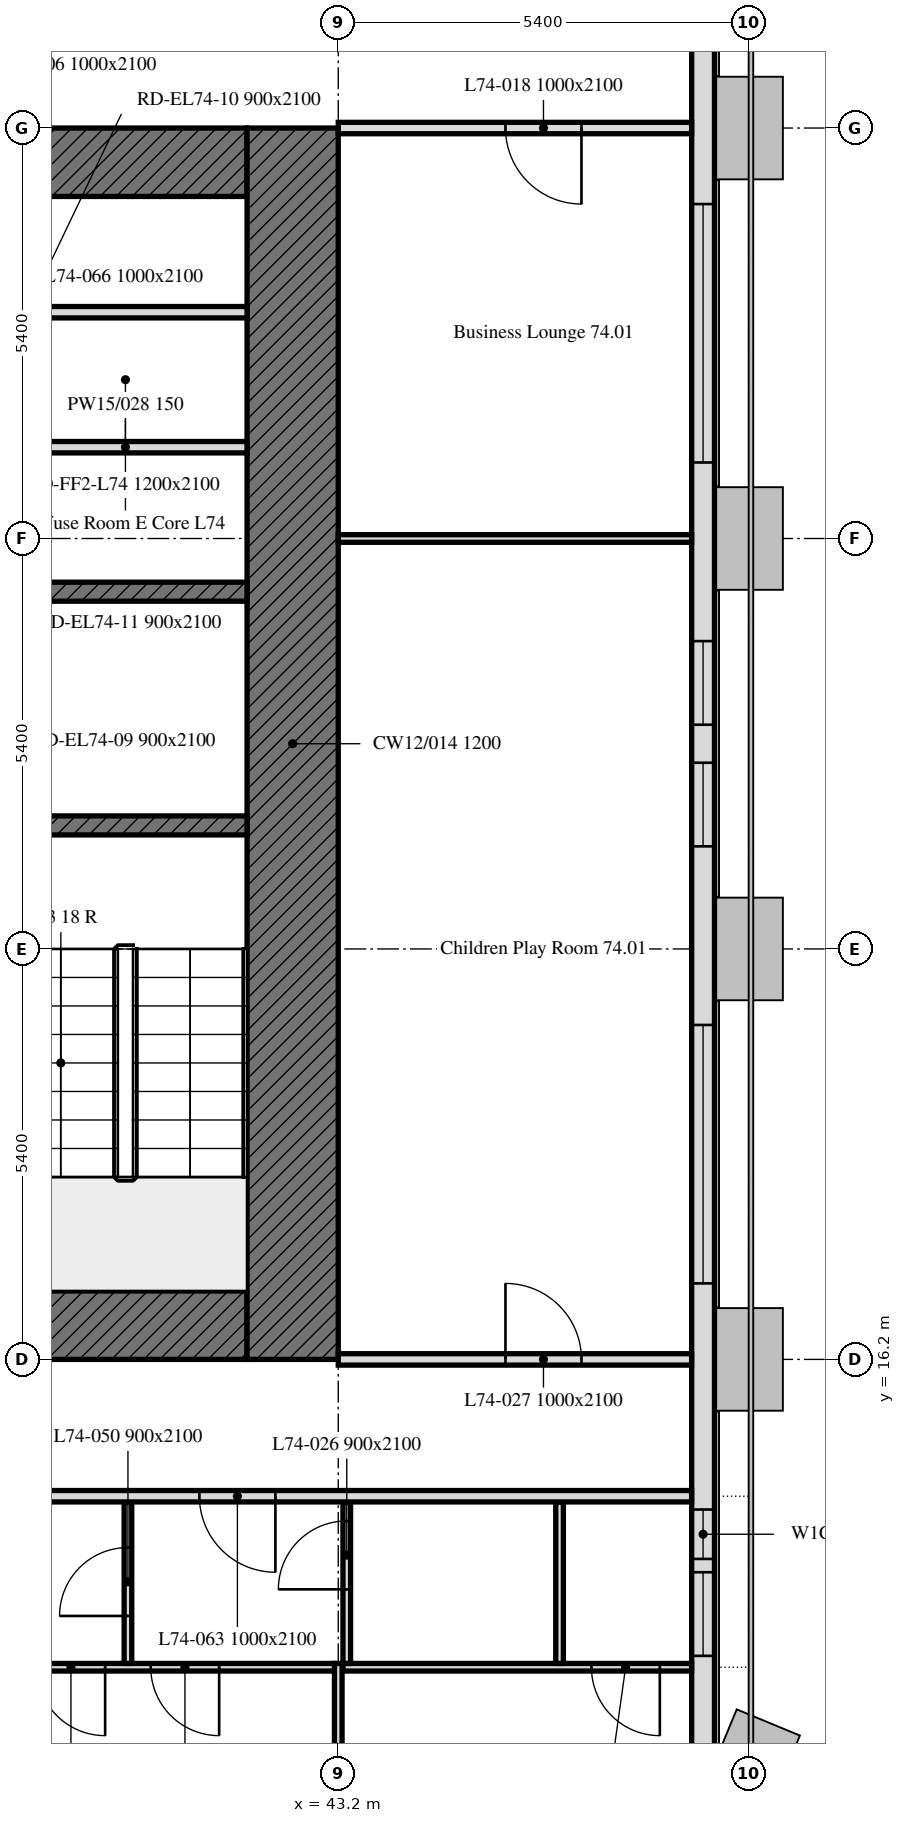
"""IFC4 building model, lengths in metres.
Left out: names, types, materials, properties, quantities, classifications, styles, units other than length and angle.
Written with IfcOpenShell. Run it as: python <this file> out.ifc"""

import sys

from ifc_helpers import new_model, si_unit, direction, frame, frame_2d, origin, place, context, subcontext, project, spatial, rectangle, extrude, element, fill, save


model = new_model("IFC4")
c1 = context("Model", 3, precision=1e-05, world=origin(), true_north=direction((0.0, 1.0)))
c2 = subcontext(c1, "Body", "Model", "MODEL_VIEW")
j1 = project(units=[si_unit("LENGTHUNIT", "METRE"), si_unit("PLANEANGLEUNIT", "RADIAN")], contexts=[c1])
p1 = place(None, origin())
s1 = spatial("IfcSite", under=j1, at=p1, CompositionType="ELEMENT")
p2 = place(p1, origin())
s2 = spatial("IfcBuilding", under=s1, at=p2, CompositionType="ELEMENT")
p3 = place(p2, frame((0.0, 0.0, 298.3)))
s3 = spatial("IfcBuildingStorey", under=s2, at=p3, CompositionType="ELEMENT", Elevation=298.3)
p4 = place(p3, frame((48.0, 10.986, 0.0), z_axis=(0.0, 0.0, 1.0), x_axis=(0.0, 1.0, 0.0)))
e1 = element("IfcWall", 1, at=p4, inside=s3, PredefinedType="SOLIDWALL", context=c2, shape_type="SweptSolid", body=[
    extrude(rectangle(XDim=32.027, YDim=0.3, at=frame_2d((16.014, 0.0))), origin(), (0.0, 0.0, 1.0), 3.0),
])
p5 = place(p4, frame((1.314, 0.0, 0.9)))
e2 = element("IfcOpeningElement", 2, at=p5, cuts=e1, PredefinedType="OPENING", context=c2, shape_type="SweptSolid", body=[
    extrude(rectangle(XDim=1.1, YDim=1.7, at=frame_2d((0.55, 0.85))), frame((0.0, 0.16, 0.0), z_axis=(0.0, -1.0, 0.0), x_axis=(1.0, 0.0, 0.0)), (0.0, 0.0, 1.0), 0.32),
])
p6 = place(p4, frame((2.589, 0.0, 0.9)))
e3 = element("IfcOpeningElement", 3, at=p6, cuts=e1, PredefinedType="OPENING", context=c2, shape_type="SweptSolid", body=[
    extrude(rectangle(XDim=0.65, YDim=1.7, at=frame_2d((0.325, 0.85))), frame((0.0, 0.16, 0.0), z_axis=(0.0, -1.0, 0.0), x_axis=(1.0, 0.0, 0.0)), (0.0, 0.0, 1.0), 0.32),
])
p7 = place(p4, frame((6.214, 0.0, 0.9)))
e4 = element("IfcOpeningElement", 4, at=p7, cuts=e1, PredefinedType="OPENING", context=c2, shape_type="SweptSolid", body=[
    extrude(rectangle(XDim=3.4, YDim=1.7, at=frame_2d((1.7, 0.85))), frame((0.0, 0.16, 0.0), z_axis=(0.0, -1.0, 0.0), x_axis=(1.0, 0.0, 0.0)), (0.0, 0.0, 1.0), 0.32),
])
p8 = place(p4, frame((11.964, 0.0, 0.9)))
e5 = element("IfcOpeningElement", 5, at=p8, cuts=e1, PredefinedType="OPENING", context=c2, shape_type="SweptSolid", body=[
    extrude(rectangle(XDim=1.1, YDim=1.7, at=frame_2d((0.55, 0.85))), frame((0.0, 0.16, 0.0), z_axis=(0.0, -1.0, 0.0), x_axis=(1.0, 0.0, 0.0)), (0.0, 0.0, 1.0), 0.32),
])
p9 = place(p4, frame((13.564, 0.0, 0.9)))
e6 = element("IfcOpeningElement", 6, at=p9, cuts=e1, PredefinedType="OPENING", context=c2, shape_type="SweptSolid", body=[
    extrude(rectangle(XDim=1.1, YDim=1.7, at=frame_2d((0.55, 0.85))), frame((0.0, 0.16, 0.0), z_axis=(0.0, -1.0, 0.0), x_axis=(1.0, 0.0, 0.0)), (0.0, 0.0, 1.0), 0.32),
])
p10 = place(p4, frame((17.014, 0.0, 0.9)))
e7 = element("IfcOpeningElement", 7, at=p10, cuts=e1, PredefinedType="OPENING", context=c2, shape_type="SweptSolid", body=[
    extrude(rectangle(XDim=3.4, YDim=1.7, at=frame_2d((1.7, 0.85))), frame((0.0, 0.16, 0.0), z_axis=(0.0, -1.0, 0.0), x_axis=(1.0, 0.0, 0.0)), (0.0, 0.0, 1.0), 0.32),
])
p11 = place(p4, frame((23.389, 0.0, 0.9)))
e8 = element("IfcOpeningElement", 8, at=p11, cuts=e1, PredefinedType="OPENING", context=c2, shape_type="SweptSolid", body=[
    extrude(rectangle(XDim=0.65, YDim=1.7, at=frame_2d((0.325, 0.85))), frame((0.0, 0.16, 0.0), z_axis=(0.0, -1.0, 0.0), x_axis=(1.0, 0.0, 0.0)), (0.0, 0.0, 1.0), 0.32),
])
p12 = place(p4, frame((24.364, 0.0, 0.9)))
e9 = element("IfcOpeningElement", 9, at=p12, cuts=e1, PredefinedType="OPENING", context=c2, shape_type="SweptSolid", body=[
    extrude(rectangle(XDim=1.1, YDim=1.7, at=frame_2d((0.55, 0.85))), frame((0.0, 0.16, 0.0), z_axis=(0.0, -1.0, 0.0), x_axis=(1.0, 0.0, 0.0)), (0.0, 0.0, 1.0), 0.32),
])
p13 = place(p4, frame((28.164, 0.0, 0.9)))
e10 = element("IfcOpeningElement", 10, at=p13, cuts=e1, PredefinedType="OPENING", context=c2, shape_type="SweptSolid", body=[
    extrude(rectangle(XDim=1.1, YDim=1.7, at=frame_2d((0.55, 0.85))), frame((0.0, 0.16, 0.0), z_axis=(0.0, -1.0, 0.0), x_axis=(1.0, 0.0, 0.0)), (0.0, 0.0, 1.0), 0.32),
])
p14 = place(p4, frame((29.764, 0.0, 0.9)))
e11 = element("IfcOpeningElement", 11, at=p14, cuts=e1, PredefinedType="OPENING", context=c2, shape_type="SweptSolid", body=[
    extrude(rectangle(XDim=1.1, YDim=1.7, at=frame_2d((0.55, 0.85))), frame((0.0, 0.16, 0.0), z_axis=(0.0, -1.0, 0.0), x_axis=(1.0, 0.0, 0.0)), (0.0, 0.0, 1.0), 0.32),
])
p15 = place(p3, frame((42.0, 16.65, 0.0), z_axis=(0.0, 0.0, 1.0), x_axis=(-1.0, 0.0, 0.0)))
e12 = element("IfcWall", 12, at=p15, inside=s3, PredefinedType="SOLIDWALL", context=c2, shape_type="SweptSolid", body=[
    extrude(rectangle(XDim=11.1, YDim=0.9, at=frame_2d((5.55, 0.0))), origin(), (0.0, 0.0, 1.0), 3.0),
])
p16 = place(p15, frame((3.55, 0.0, 0.0)))
e13 = element("IfcOpeningElement", 13, at=p16, cuts=e12, PredefinedType="OPENING", context=c2, shape_type="SweptSolid", body=[
    extrude(rectangle(XDim=2.0, YDim=2.4, at=frame_2d((1.0, 1.2))), frame((0.0, 0.45, 0.0), z_axis=(0.0, -1.0, 0.0), x_axis=(1.0, 0.0, 0.0)), (0.0, 0.0, 1.0), 0.9),
])
p17 = place(p3, frame((30.9, 31.95, 0.0), z_axis=(0.0, 0.0, 1.0), x_axis=(1.0, 0.0, 0.0)))
e14 = element("IfcWall", 14, at=p17, inside=s3, PredefinedType="SOLIDWALL", context=c2, shape_type="SweptSolid", body=[
    extrude(rectangle(XDim=11.1, YDim=0.9, at=frame_2d((5.55, 0.0))), origin(), (0.0, 0.0, 1.0), 3.0),
])
p18 = place(p17, frame((5.55, 0.0, 0.0)))
e15 = element("IfcOpeningElement", 15, at=p18, cuts=e14, PredefinedType="OPENING", context=c2, shape_type="SweptSolid", body=[
    extrude(rectangle(XDim=2.0, YDim=2.4, at=frame_2d((1.0, 1.2))), frame((0.0, 0.45, 0.0), z_axis=(0.0, -1.0, 0.0), x_axis=(1.0, 0.0, 0.0)), (0.0, 0.0, 1.0), 0.9),
])
p19 = place(p3, frame((42.6, 32.4, 0.0), z_axis=(0.0, 0.0, 1.0), x_axis=(0.0, -1.0, 0.0)))
e16 = element("IfcWall", 16, at=p19, inside=s3, PredefinedType="SOLIDWALL", context=c2, shape_type="SweptSolid", body=[
    extrude(rectangle(XDim=16.2, YDim=1.2, at=frame_2d((8.1, 0.0))), origin(), (0.0, 0.0, 1.0), 3.0),
])
for number, where, z_axis, x_axis in (
    (17, (38.8, 23.225, 0.0), (0.0, 0.0, 1.0), (1.0, 0.0, 0.0)),
    (18, (38.8, 26.3, 0.0), (0.0, 0.0, 1.0), (1.0, 0.0, 0.0)),
):
    element("IfcWall", number, at=place(p3, frame(where, z_axis=z_axis, x_axis=x_axis)), inside=s3, PredefinedType="SOLIDWALL", context=c2, shape_type="SweptSolid", body=[
        extrude(rectangle(XDim=3.2, YDim=0.25, at=frame_2d((1.6, 0.0))), origin(), (0.0, 0.0, 1.0), 3.0),
    ])
for number, where, z_axis, x_axis in (
    (19, (38.8, 28.201, 0.0), (0.0, 0.0, 1.0), (1.0, 0.0, 0.0)),
    (20, (38.8, 29.977, 0.0), (0.0, 0.0, 1.0), (1.0, 0.0, 0.0)),
):
    element("IfcWall", number, at=place(p3, frame(where, z_axis=z_axis, x_axis=x_axis)), inside=s3, PredefinedType="PARTITIONING", context=c2, shape_type="SweptSolid", body=[
        extrude(rectangle(XDim=3.2, YDim=0.15, at=frame_2d((1.6, 0.0))), origin(), (0.0, 0.0, 1.0), 3.0),
    ])
p20 = place(p3, frame((47.849, 32.4, 0.0), z_axis=(0.0, 0.0, 1.0), x_axis=(-1.0, 0.0, 0.0)))
e21 = element("IfcWall", 21, at=p20, inside=s3, PredefinedType="PARTITIONING", context=c2, shape_type="SweptSolid", body=[
    extrude(rectangle(XDim=4.649, YDim=0.15, at=frame_2d((2.325, 0.0))), origin(), (0.0, 0.0, 1.0), 2.4),
])
p21 = place(p20, frame((1.449, 0.0, 0.0)))
e22 = element("IfcOpeningElement", 22, at=p21, cuts=e21, PredefinedType="OPENING", context=c2, shape_type="SweptSolid", body=[
    extrude(rectangle(XDim=1.0, YDim=2.1, at=frame_2d((0.5, 1.05))), frame((0.0, 0.075, 0.0), z_axis=(0.0, -1.0, 0.0), x_axis=(1.0, 0.0, 0.0)), (0.0, 0.0, 1.0), 0.15),
])
p22 = place(p3, frame((43.2, 27.0, 0.0), z_axis=(0.0, 0.0, 1.0), x_axis=(1.0, 0.0, 0.0)))
e23 = element("IfcWall", 23, at=p22, inside=s3, PredefinedType="PARTITIONING", context=c2, shape_type="SweptSolid", body=[
    extrude(rectangle(XDim=4.649, YDim=0.1, at=frame_2d((2.325, 0.0))), origin(), (0.0, 0.0, 1.0), 2.4),
])
p23 = place(p3, frame((43.2, 11.12, 0.0), z_axis=(0.0, 0.0, 1.0), x_axis=(0.0, 1.0, 0.0)))
e24 = element("IfcWall", 24, at=p23, inside=s3, PredefinedType="PARTITIONING", context=c2, shape_type="SweptSolid", body=[
    extrude(rectangle(XDim=1.08, YDim=0.1, at=frame_2d((0.54, 0.0))), origin(), (0.0, 0.0, 1.0), 3.0),
])
p24 = place(p3, frame((43.15, 12.15, 0.0), z_axis=(0.0, 0.0, 1.0), x_axis=(-1.0, 0.0, 0.0)))
e25 = element("IfcWall", 25, at=p24, inside=s3, PredefinedType="PARTITIONING", context=c2, shape_type="SweptSolid", body=[
    extrude(rectangle(XDim=5.275, YDim=0.1, at=frame_2d((2.637, 0.0))), origin(), (0.0, 0.0, 1.0), 3.0),
])
p25 = place(p24, frame((3.017, 0.0, 0.0)))
e26 = element("IfcOpeningElement", 26, at=p25, cuts=e25, PredefinedType="OPENING", context=c2, shape_type="SweptSolid", body=[
    extrude(rectangle(XDim=0.9, YDim=2.1, at=frame_2d((0.45, 1.05))), frame((0.0, 0.05, 0.0), z_axis=(0.0, -1.0, 0.0), x_axis=(1.0, 0.0, 0.0)), (0.0, 0.0, 1.0), 0.1),
])
p26 = place(p24, frame((1.517, 0.0, 0.0)))
e27 = element("IfcOpeningElement", 27, at=p26, cuts=e25, PredefinedType="OPENING", context=c2, shape_type="SweptSolid", body=[
    extrude(rectangle(XDim=0.9, YDim=2.1, at=frame_2d((0.45, 1.05))), frame((0.0, 0.05, 0.0), z_axis=(0.0, -1.0, 0.0), x_axis=(1.0, 0.0, 0.0)), (0.0, 0.0, 1.0), 0.1),
])
p27 = place(p3, frame((47.849, 12.15, 0.0), z_axis=(0.0, 0.0, 1.0), x_axis=(-1.0, 0.0, 0.0)))
e28 = element("IfcWall", 28, at=p27, inside=s3, PredefinedType="PARTITIONING", context=c2, shape_type="SweptSolid", body=[
    extrude(rectangle(XDim=4.587, YDim=0.1, at=frame_2d((2.293, 0.0))), origin(), (0.0, 0.0, 1.0), 3.0),
])
p28 = place(p27, frame((0.418, 0.0, 0.0)))
e29 = element("IfcOpeningElement", 29, at=p28, cuts=e28, PredefinedType="OPENING", context=c2, shape_type="SweptSolid", body=[
    extrude(rectangle(XDim=0.9, YDim=2.1, at=frame_2d((0.45, 1.05))), frame((0.0, 0.05, 0.0), z_axis=(0.0, -1.0, 0.0), x_axis=(1.0, 0.0, 0.0)), (0.0, 0.0, 1.0), 0.1),
])
p29 = place(p3, frame((40.433, 12.2, 0.0), z_axis=(0.0, 0.0, 1.0), x_axis=(0.0, 1.0, 0.0)))
e30 = element("IfcWall", 30, at=p29, inside=s3, PredefinedType="PARTITIONING", context=c2, shape_type="SweptSolid", body=[
    extrude(rectangle(XDim=2.125, YDim=0.1, at=frame_2d((1.062, 0.0))), origin(), (0.0, 0.0, 1.0), 3.0),
])
p30 = place(p29, frame((0.625, 0.0, 0.0)))
e31 = element("IfcOpeningElement", 31, at=p30, cuts=e30, PredefinedType="OPENING", context=c2, shape_type="SweptSolid", body=[
    extrude(rectangle(XDim=0.9, YDim=2.1, at=frame_2d((0.45, 1.05))), frame((0.0, 0.05, 0.0), z_axis=(0.0, -1.0, 0.0), x_axis=(1.0, 0.0, 0.0)), (0.0, 0.0, 1.0), 0.1),
])
p31 = place(p3, frame((43.312, 12.2, 0.0), z_axis=(0.0, 0.0, 1.0), x_axis=(0.0, 1.0, 0.0)))
e32 = element("IfcWall", 32, at=p31, inside=s3, PredefinedType="PARTITIONING", context=c2, shape_type="SweptSolid", body=[
    extrude(rectangle(XDim=2.125, YDim=0.1, at=frame_2d((1.062, 0.0))), origin(), (0.0, 0.0, 1.0), 3.0),
])
p32 = place(p31, frame((0.975, 0.0, 0.0)))
e33 = element("IfcOpeningElement", 33, at=p32, cuts=e32, PredefinedType="OPENING", context=c2, shape_type="SweptSolid", body=[
    extrude(rectangle(XDim=0.9, YDim=2.1, at=frame_2d((0.45, 1.05))), frame((0.0, 0.05, 0.0), z_axis=(0.0, -1.0, 0.0), x_axis=(1.0, 0.0, 0.0)), (0.0, 0.0, 1.0), 0.1),
])
p33 = place(p3, frame((46.112, 12.2, 0.0), z_axis=(0.0, 0.0, 1.0), x_axis=(0.0, 1.0, 0.0)))
e34 = element("IfcWall", 34, at=p33, inside=s3, PredefinedType="PARTITIONING", context=c2, shape_type="SweptSolid", body=[
    extrude(rectangle(XDim=2.125, YDim=0.1, at=frame_2d((1.062, 0.0))), origin(), (0.0, 0.0, 1.0), 3.0),
])
p34 = place(p3, frame((47.849, 14.4, 0.0), z_axis=(0.0, 0.0, 1.0), x_axis=(-1.0, 0.0, 0.0)))
e35 = element("IfcWall", 35, at=p34, inside=s3, PredefinedType="PARTITIONING", context=c2, shape_type="SweptSolid", body=[
    extrude(rectangle(XDim=41.698, YDim=0.15, at=frame_2d((20.849, 0.0))), origin(), (0.0, 0.0, 1.0), 3.0),
])
p35 = place(p34, frame((38.179, 0.0, 0.0)))
e36 = element("IfcOpeningElement", 36, at=p35, cuts=e35, PredefinedType="OPENING", context=c2, shape_type="SweptSolid", body=[
    extrude(rectangle(XDim=1.0, YDim=2.1, at=frame_2d((0.5, 1.05))), frame((0.0, 0.075, 0.0), z_axis=(0.0, -1.0, 0.0), x_axis=(1.0, 0.0, 0.0)), (0.0, 0.0, 1.0), 0.15),
])
p36 = place(p34, frame((27.977, 0.0, 0.0)))
e37 = element("IfcOpeningElement", 37, at=p36, cuts=e35, PredefinedType="OPENING", context=c2, shape_type="SweptSolid", body=[
    extrude(rectangle(XDim=1.0, YDim=2.1, at=frame_2d((0.5, 1.05))), frame((0.0, 0.075, 0.0), z_axis=(0.0, -1.0, 0.0), x_axis=(1.0, 0.0, 0.0)), (0.0, 0.0, 1.0), 0.15),
])
p37 = place(p34, frame((16.399, 0.0, 0.0)))
e38 = element("IfcOpeningElement", 38, at=p37, cuts=e35, PredefinedType="OPENING", context=c2, shape_type="SweptSolid", body=[
    extrude(rectangle(XDim=1.0, YDim=2.1, at=frame_2d((0.5, 1.05))), frame((0.0, 0.075, 0.0), z_axis=(0.0, -1.0, 0.0), x_axis=(1.0, 0.0, 0.0)), (0.0, 0.0, 1.0), 0.15),
])
p38 = place(p34, frame((5.476, 0.0, 0.0)))
e39 = element("IfcOpeningElement", 39, at=p38, cuts=e35, PredefinedType="OPENING", context=c2, shape_type="SweptSolid", body=[
    extrude(rectangle(XDim=1.0, YDim=2.1, at=frame_2d((0.5, 1.05))), frame((0.0, 0.075, 0.0), z_axis=(0.0, -1.0, 0.0), x_axis=(1.0, 0.0, 0.0)), (0.0, 0.0, 1.0), 0.15),
])
p39 = place(p3, frame((43.2, 16.2, 0.0), z_axis=(0.0, 0.0, 1.0), x_axis=(1.0, 0.0, 0.0)))
e40 = element("IfcWall", 40, at=p39, inside=s3, PredefinedType="PARTITIONING", context=c2, shape_type="SweptSolid", body=[
    extrude(rectangle(XDim=4.649, YDim=0.15, at=frame_2d((2.325, 0.0))), origin(), (0.0, 0.0, 1.0), 2.4),
])
p40 = place(p39, frame((2.2, 0.0, 0.0)))
e41 = element("IfcOpeningElement", 41, at=p40, cuts=e40, PredefinedType="OPENING", context=c2, shape_type="SweptSolid", body=[
    extrude(rectangle(XDim=1.0, YDim=2.1, at=frame_2d((0.5, 1.05))), frame((0.0, 0.075, 0.0), z_axis=(0.0, -1.0, 0.0), x_axis=(1.0, 0.0, 0.0)), (0.0, 0.0, 1.0), 0.15),
])
p41 = place(p5, origin())
e42 = element("IfcWindow", 42, at=p41, inside=s3, PartitioningType="SINGLE_PANEL", PredefinedType="WINDOW", context=c2, shape_type="SweptSolid", body=[
    extrude(rectangle(XDim=1.1, YDim=1.7, at=frame_2d((0.55, 0.85))), frame((0.0, 0.03, 0.0), z_axis=(0.0, -1.0, 0.0), x_axis=(1.0, 0.0, 0.0)), (0.0, 0.0, 1.0), 0.06),
])
fill(e2, e42)
p42 = place(p6, origin())
e43 = element("IfcWindow", 43, at=p42, inside=s3, PartitioningType="SINGLE_PANEL", PredefinedType="WINDOW", context=c2, shape_type="SweptSolid", body=[
    extrude(rectangle(XDim=0.65, YDim=1.7, at=frame_2d((0.325, 0.85))), frame((0.0, 0.03, 0.0), z_axis=(0.0, -1.0, 0.0), x_axis=(1.0, 0.0, 0.0)), (0.0, 0.0, 1.0), 0.06),
])
fill(e3, e43)
p43 = place(p7, origin())
e44 = element("IfcWindow", 44, at=p43, inside=s3, PartitioningType="SINGLE_PANEL", PredefinedType="WINDOW", context=c2, shape_type="SweptSolid", body=[
    extrude(rectangle(XDim=3.4, YDim=1.7, at=frame_2d((1.7, 0.85))), frame((0.0, 0.03, 0.0), z_axis=(0.0, -1.0, 0.0), x_axis=(1.0, 0.0, 0.0)), (0.0, 0.0, 1.0), 0.06),
])
fill(e4, e44)
p44 = place(p8, origin())
e45 = element("IfcWindow", 45, at=p44, inside=s3, PartitioningType="SINGLE_PANEL", PredefinedType="WINDOW", context=c2, shape_type="SweptSolid", body=[
    extrude(rectangle(XDim=1.1, YDim=1.7, at=frame_2d((0.55, 0.85))), frame((0.0, 0.03, 0.0), z_axis=(0.0, -1.0, 0.0), x_axis=(1.0, 0.0, 0.0)), (0.0, 0.0, 1.0), 0.06),
])
fill(e5, e45)
p45 = place(p9, origin())
e46 = element("IfcWindow", 46, at=p45, inside=s3, PartitioningType="SINGLE_PANEL", PredefinedType="WINDOW", context=c2, shape_type="SweptSolid", body=[
    extrude(rectangle(XDim=1.1, YDim=1.7, at=frame_2d((0.55, 0.85))), frame((0.0, 0.03, 0.0), z_axis=(0.0, -1.0, 0.0), x_axis=(1.0, 0.0, 0.0)), (0.0, 0.0, 1.0), 0.06),
])
fill(e6, e46)
p46 = place(p10, origin())
e47 = element("IfcWindow", 47, at=p46, inside=s3, PartitioningType="SINGLE_PANEL", PredefinedType="WINDOW", context=c2, shape_type="SweptSolid", body=[
    extrude(rectangle(XDim=3.4, YDim=1.7, at=frame_2d((1.7, 0.85))), frame((0.0, 0.03, 0.0), z_axis=(0.0, -1.0, 0.0), x_axis=(1.0, 0.0, 0.0)), (0.0, 0.0, 1.0), 0.06),
])
fill(e7, e47)
p47 = place(p21, origin())
e48 = element("IfcDoor", 48, at=p47, inside=s3, OperationType="SINGLE_SWING_LEFT", PredefinedType="DOOR", context=c2, shape_type="SweptSolid", body=[
    extrude(rectangle(XDim=1.0, YDim=2.1, at=frame_2d((0.5, 1.05))), frame((0.0, 0.025, 0.0), z_axis=(0.0, -1.0, 0.0), x_axis=(1.0, 0.0, 0.0)), (0.0, 0.0, 1.0), 0.05),
])
fill(e22, e48)
p48 = place(p28, origin())
e49 = element("IfcDoor", 49, at=p48, inside=s3, OperationType="SINGLE_SWING_RIGHT", PredefinedType="DOOR", context=c2, shape_type="SweptSolid", body=[
    extrude(rectangle(XDim=0.9, YDim=2.1, at=frame_2d((0.45, 1.05))), frame((0.0, 0.025, 0.0), z_axis=(0.0, -1.0, 0.0), x_axis=(1.0, 0.0, 0.0)), (0.0, 0.0, 1.0), 0.05),
])
fill(e29, e49)
p49 = place(p32, origin())
e50 = element("IfcDoor", 50, at=p49, inside=s3, OperationType="SINGLE_SWING_LEFT", PredefinedType="DOOR", context=c2, shape_type="SweptSolid", body=[
    extrude(rectangle(XDim=0.9, YDim=2.1, at=frame_2d((0.45, 1.05))), frame((0.0, 0.025, 0.0), z_axis=(0.0, -1.0, 0.0), x_axis=(1.0, 0.0, 0.0)), (0.0, 0.0, 1.0), 0.05),
])
fill(e33, e50)
p50 = place(p40, origin())
e51 = element("IfcDoor", 51, at=p50, inside=s3, OperationType="SINGLE_SWING_LEFT", PredefinedType="DOOR", context=c2, shape_type="SweptSolid", body=[
    extrude(rectangle(XDim=1.0, YDim=2.1, at=frame_2d((0.5, 1.05))), frame((0.0, 0.025, 0.0), z_axis=(0.0, -1.0, 0.0), x_axis=(1.0, 0.0, 0.0)), (0.0, 0.0, 1.0), 0.05),
])
fill(e41, e51)
p51 = place(p25, origin())
e52 = element("IfcDoor", 52, at=p51, inside=s3, OperationType="SINGLE_SWING_LEFT", PredefinedType="DOOR", context=c2, shape_type="SweptSolid", body=[
    extrude(rectangle(XDim=0.9, YDim=2.1, at=frame_2d((0.45, 1.05))), frame((0.0, 0.025, 0.0), z_axis=(0.0, -1.0, 0.0), x_axis=(1.0, 0.0, 0.0)), (0.0, 0.0, 1.0), 0.05),
])
fill(e26, e52)
p52 = place(p30, origin())
e53 = element("IfcDoor", 53, at=p52, inside=s3, OperationType="SINGLE_SWING_LEFT", PredefinedType="DOOR", context=c2, shape_type="SweptSolid", body=[
    extrude(rectangle(XDim=0.9, YDim=2.1, at=frame_2d((0.45, 1.05))), frame((0.0, 0.025, 0.0), z_axis=(0.0, -1.0, 0.0), x_axis=(1.0, 0.0, 0.0)), (0.0, 0.0, 1.0), 0.05),
])
fill(e31, e53)
p53 = place(p26, origin())
e54 = element("IfcDoor", 54, at=p53, inside=s3, OperationType="SINGLE_SWING_RIGHT", PredefinedType="DOOR", context=c2, shape_type="SweptSolid", body=[
    extrude(rectangle(XDim=0.9, YDim=2.1, at=frame_2d((0.45, 1.05))), frame((0.0, 0.025, 0.0), z_axis=(0.0, -1.0, 0.0), x_axis=(1.0, 0.0, 0.0)), (0.0, 0.0, 1.0), 0.05),
])
fill(e27, e54)
p54 = place(p38, origin())
e55 = element("IfcDoor", 55, at=p54, inside=s3, OperationType="SINGLE_SWING_LEFT", PredefinedType="DOOR", context=c2, shape_type="SweptSolid", body=[
    extrude(rectangle(XDim=1.0, YDim=2.1, at=frame_2d((0.5, 1.05))), frame((0.0, 0.025, 0.0), z_axis=(0.0, -1.0, 0.0), x_axis=(1.0, 0.0, 0.0)), (0.0, 0.0, 1.0), 0.05),
])
fill(e39, e55)
save(model, sys.argv[1])
